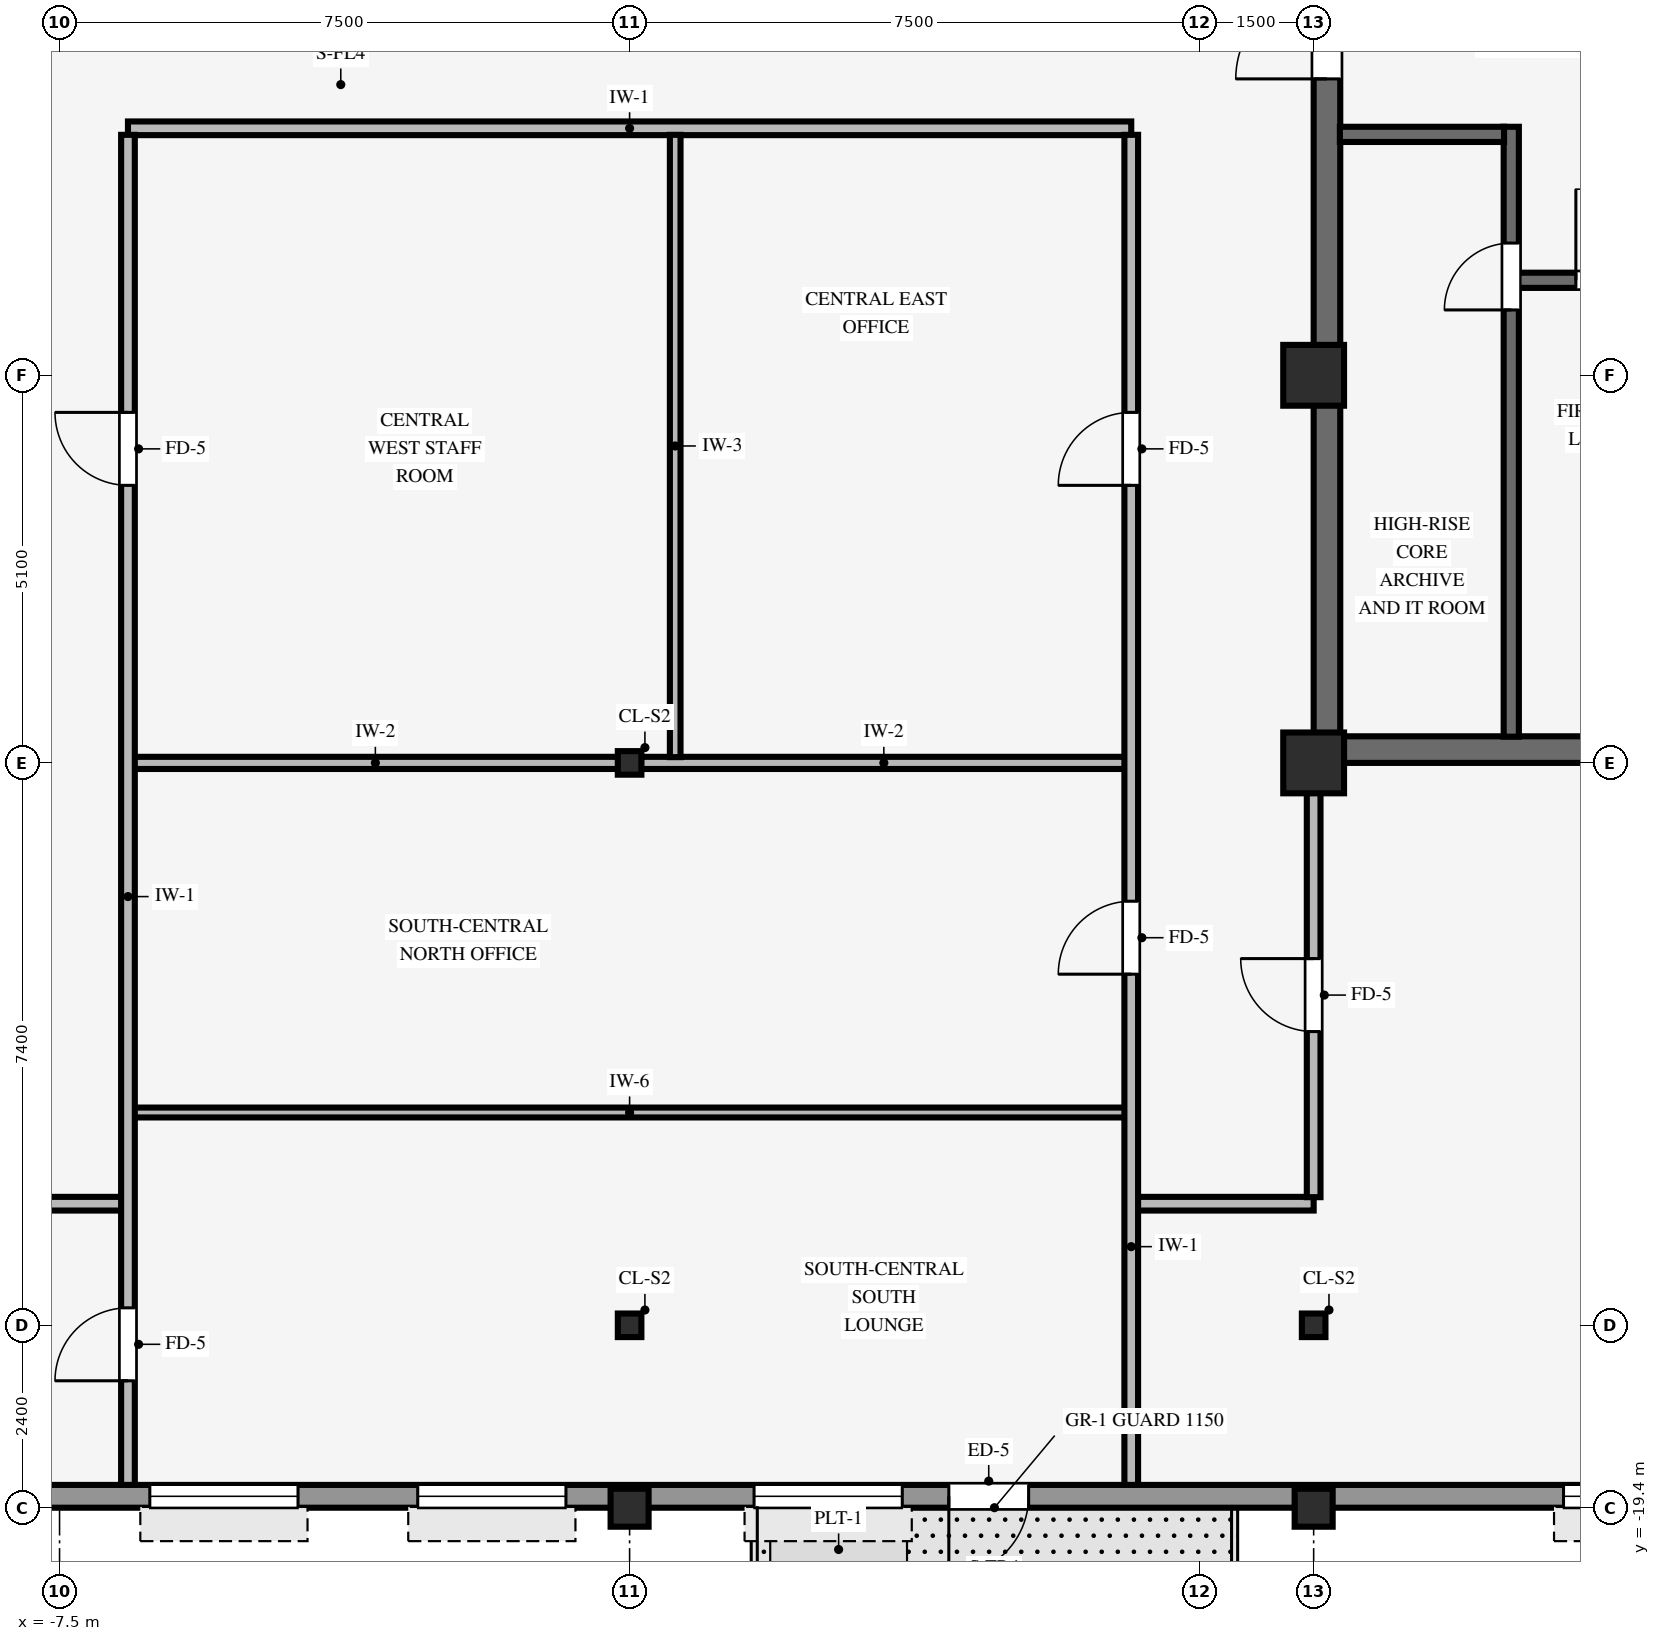
"""IFC4 building model, lengths in metres.
Left out: names, types, materials, properties, quantities, classifications, styles, units other than length and angle.
Written with IfcOpenShell. Run it as: python <this file> out.ifc"""

import sys

from ifc_helpers import new_model, si_unit, direction, frame, frame_2d, origin, origin_2d, place, context, subcontext, project, spatial, rectangle, hollow_rectangle, i_section, extrude, source, transform, mapped, element, fill, save


model = new_model("IFC4")
c1 = context("Model", 3, precision=1e-05, world=origin(), true_north=direction((0.0, 1.0)))
c2 = subcontext(c1, "Body", "Model", "MODEL_VIEW")
j1 = project(units=[si_unit("LENGTHUNIT", "METRE"), si_unit("PLANEANGLEUNIT", "RADIAN")], contexts=[c1])
p1 = place(None, origin())
s1 = spatial("IfcSite", under=j1, at=p1, CompositionType="ELEMENT")
p2 = place(p1, origin())
s2 = spatial("IfcBuilding", under=s1, at=p2, CompositionType="ELEMENT")
p3 = place(p2, frame((0.0, 0.0, 234.7)))
s3 = spatial("IfcBuildingStorey", under=s2, at=p3, CompositionType="ELEMENT", Elevation=234.7)
p4 = place(p3, frame((9.0, -9.425, 0.0), z_axis=(0.0, 0.0, 1.0), x_axis=(1.0, 0.0, 0.0)))
e1 = element("IfcWall", 1, at=p4, inside=s3, PredefinedType="SHEAR", context=c2, shape_type="SweptSolid", body=[
    extrude(rectangle(XDim=8.5, YDim=0.35, at=frame_2d((4.25, 0.0))), origin(), (0.0, 0.0, 1.0), 3.37),
])
p5 = place(p3, frame((9.175, -9.255, 0.0), z_axis=(0.0, 0.0, 1.0), x_axis=(0.0, 1.0, 0.0)))
e2 = element("IfcWall", 2, at=p5, inside=s3, PredefinedType="SHEAR", context=c2, shape_type="SweptSolid", body=[
    extrude(rectangle(XDim=18.51, YDim=0.35, at=frame_2d((9.255, 0.0))), origin(), (0.0, 0.0, 1.0), 3.37),
])
p6 = place(p5, frame((8.655, 0.0, 0.0)))
e3 = element("IfcOpeningElement", 3, at=p6, cuts=e2, PredefinedType="OPENING", context=c2, shape_type="SweptSolid", body=[
    extrude(rectangle(XDim=1.2, YDim=2.15, at=frame_2d((0.6, 1.075))), frame((0.0, 0.185, 0.0), z_axis=(0.0, -1.0, 0.0), x_axis=(1.0, 0.0, 0.0)), (0.0, 0.0, 1.0), 0.37),
])
for number, where, z_axis, x_axis in (
    (4, (9.0, -9.6, 0.0), (0.0, 0.0, 1.0), (1.0, 0.0, 0.0)),
    (5, (9.0, -4.5, 0.0), (0.0, 0.0, 1.0), (1.0, 0.0, 0.0)),
):
    element("IfcColumn", number, at=place(p3, frame(where, z_axis=z_axis, x_axis=x_axis)), inside=s3, PredefinedType="COLUMN", context=c2, shape_type="SweptSolid", body=[
        extrude(rectangle(XDim=0.8, YDim=0.8, at=origin_2d()), origin(), (0.0, 0.0, 1.0), 3.37),
    ])
for number, where, z_axis, x_axis in (
    (6, (0.0, -19.4, 0.0), (0.0, 0.0, 1.0), (1.0, 0.0, 0.0)),
    (7, (9.0, -19.4, 0.0), (0.0, 0.0, 1.0), (1.0, 0.0, 0.0)),
):
    element("IfcColumn", number, at=place(p3, frame(where, z_axis=z_axis, x_axis=x_axis)), inside=s3, PredefinedType="COLUMN", context=c2, shape_type="SweptSolid", body=[
        extrude(hollow_rectangle(XDim=0.5, YDim=0.5, WallThickness=0.032, InnerFilletRadius=0.032, OuterFilletRadius=0.064, at=origin_2d()), origin(), (0.0, 0.0, 1.0), 3.37),
    ])
for number, where, z_axis, x_axis in (
    (8, (0.0, -17.0, 0.0), (0.0, 0.0, 1.0), (1.0, 0.0, 0.0)),
    (9, (0.0, -9.6, 0.0), (0.0, 0.0, 1.0), (1.0, 0.0, 0.0)),
    (10, (9.0, -17.0, 0.0), (0.0, 0.0, 1.0), (1.0, 0.0, 0.0)),
):
    element("IfcColumn", number, at=place(p3, frame(where, z_axis=z_axis, x_axis=x_axis)), inside=s3, PredefinedType="COLUMN", context=c2, shape_type="SweptSolid", body=[
        extrude(i_section(OverallWidth=0.31, OverallDepth=0.31, WebThickness=0.015, FlangeThickness=0.015, FilletRadius=0.015, at=origin_2d()), origin(), (0.0, 0.0, 1.0), 3.37),
    ])
p7 = place(p3, frame((-24.3, -19.25, 0.0), z_axis=(0.0, 0.0, 1.0), x_axis=(1.0, 0.0, 0.0)))
e11 = element("IfcWall", 11, at=p7, inside=s3, PredefinedType="STANDARD", context=c2, shape_type="SweptSolid", body=[
    extrude(rectangle(XDim=41.0, YDim=0.3, at=frame_2d((20.5, 0.0))), origin(), (0.0, 0.0, 1.0), 2.705),
])
p8 = place(p7, frame((29.55, 0.0, 0.0), z_axis=(0.0, 0.0, 1.0), x_axis=(-1.0, 0.0, 0.0)))
e12 = element("IfcOpeningElement", 12, at=p8, cuts=e11, PredefinedType="OPENING", context=c2, shape_type="SweptSolid", body=[
    extrude(rectangle(XDim=1.05, YDim=2.1, at=frame_2d((0.525, 1.05))), frame((0.0, 0.16, 0.0), z_axis=(0.0, -1.0, 0.0), x_axis=(1.0, 0.0, 0.0)), (0.0, 0.0, 1.0), 0.32),
])
p9 = place(p7, frame((2.462, 0.0, 0.8)))
e13 = element("IfcOpeningElement", 13, at=p9, cuts=e11, PredefinedType="OPENING", context=c2, shape_type="SweptSolid", body=[
    extrude(rectangle(XDim=1.95, YDim=1.48, at=frame_2d((0.975, 0.74))), frame((0.0, 0.16, 0.0), z_axis=(0.0, -1.0, 0.0), x_axis=(1.0, 0.0, 0.0)), (0.0, 0.0, 1.0), 0.32),
])
p10 = place(p7, frame((7.788, 0.0, 0.8)))
e14 = element("IfcOpeningElement", 14, at=p10, cuts=e11, PredefinedType="OPENING", context=c2, shape_type="SweptSolid", body=[
    extrude(rectangle(XDim=1.95, YDim=1.48, at=frame_2d((0.975, 0.74))), frame((0.0, 0.16, 0.0), z_axis=(0.0, -1.0, 0.0), x_axis=(1.0, 0.0, 0.0)), (0.0, 0.0, 1.0), 0.32),
])
p11 = place(p7, frame((12.212, 0.0, 0.8)))
e15 = element("IfcOpeningElement", 15, at=p11, cuts=e11, PredefinedType="OPENING", context=c2, shape_type="SweptSolid", body=[
    extrude(rectangle(XDim=1.95, YDim=1.48, at=frame_2d((0.975, 0.74))), frame((0.0, 0.16, 0.0), z_axis=(0.0, -1.0, 0.0), x_axis=(1.0, 0.0, 0.0)), (0.0, 0.0, 1.0), 0.32),
])
p12 = place(p7, frame((17.988, 0.0, 0.8)))
e16 = element("IfcOpeningElement", 16, at=p12, cuts=e11, PredefinedType="OPENING", context=c2, shape_type="SweptSolid", body=[
    extrude(rectangle(XDim=1.95, YDim=1.48, at=frame_2d((0.975, 0.74))), frame((0.0, 0.16, 0.0), z_axis=(0.0, -1.0, 0.0), x_axis=(1.0, 0.0, 0.0)), (0.0, 0.0, 1.0), 0.32),
])
p13 = place(p7, frame((21.512, 0.0, 0.8)))
e17 = element("IfcOpeningElement", 17, at=p13, cuts=e11, PredefinedType="OPENING", context=c2, shape_type="SweptSolid", body=[
    extrude(rectangle(XDim=1.95, YDim=1.48, at=frame_2d((0.975, 0.74))), frame((0.0, 0.16, 0.0), z_axis=(0.0, -1.0, 0.0), x_axis=(1.0, 0.0, 0.0)), (0.0, 0.0, 1.0), 0.32),
])
p14 = place(p7, frame((25.938, 0.0, 0.8)))
e18 = element("IfcOpeningElement", 18, at=p14, cuts=e11, PredefinedType="OPENING", context=c2, shape_type="SweptSolid", body=[
    extrude(rectangle(XDim=1.95, YDim=1.48, at=frame_2d((0.975, 0.74))), frame((0.0, 0.16, 0.0), z_axis=(0.0, -1.0, 0.0), x_axis=(1.0, 0.0, 0.0)), (0.0, 0.0, 1.0), 0.32),
])
p15 = place(p7, frame((36.587, 0.0, 0.8)))
e19 = element("IfcOpeningElement", 19, at=p15, cuts=e11, PredefinedType="OPENING", context=c2, shape_type="SweptSolid", body=[
    extrude(rectangle(XDim=1.95, YDim=1.48, at=frame_2d((0.975, 0.74))), frame((0.0, 0.16, 0.0), z_axis=(0.0, -1.0, 0.0), x_axis=(1.0, 0.0, 0.0)), (0.0, 0.0, 1.0), 0.32),
])
p16 = place(p3, frame((11.6, -9.255, 0.0), z_axis=(0.0, 0.0, 1.0), x_axis=(0.0, 1.0, 0.0)))
e20 = element("IfcWall", 20, at=p16, inside=s3, PredefinedType="SHEAR", context=c2, shape_type="SweptSolid", body=[
    extrude(rectangle(XDim=8.025, YDim=0.2, at=frame_2d((4.012, 0.0))), origin(), (0.0, 0.0, 1.0), 3.37),
])
p17 = place(p16, frame((5.615, 0.0, 0.0)))
e21 = element("IfcOpeningElement", 21, at=p17, cuts=e20, PredefinedType="OPENING", context=c2, shape_type="SweptSolid", body=[
    extrude(rectangle(XDim=0.88, YDim=2.1, at=frame_2d((0.44, 1.05))), frame((0.0, 0.11, 0.0), z_axis=(0.0, -1.0, 0.0), x_axis=(1.0, 0.0, 0.0)), (0.0, 0.0, 1.0), 0.22),
])
p18 = place(p3, frame((11.695, -3.25, 0.0), z_axis=(0.0, 0.0, 1.0), x_axis=(1.0, 0.0, 0.0)))
e22 = element("IfcWall", 22, at=p18, inside=s3, PredefinedType="SHEAR", context=c2, shape_type="SweptSolid", body=[
    extrude(rectangle(XDim=2.76, YDim=0.2, at=frame_2d((1.38, 0.0))), origin(), (0.0, 0.0, 1.0), 3.37),
])
p19 = place(p18, frame((0.755, 0.0, 0.0)))
e23 = element("IfcOpeningElement", 23, at=p19, cuts=e22, PredefinedType="OPENING", context=c2, shape_type="SweptSolid", body=[
    extrude(rectangle(XDim=1.2, YDim=2.15, at=frame_2d((0.6, 1.075))), frame((0.0, 0.11, 0.0), z_axis=(0.0, -1.0, 0.0), x_axis=(1.0, 0.0, 0.0)), (0.0, 0.0, 1.0), 0.22),
])
p20 = place(p3, frame((9.345, -1.33, 0.0), z_axis=(0.0, 0.0, 1.0), x_axis=(1.0, 0.0, 0.0)))
e24 = element("IfcWall", 24, at=p20, inside=s3, PredefinedType="SHEAR", context=c2, shape_type="SweptSolid", body=[
    extrude(rectangle(XDim=2.16, YDim=0.2, at=frame_2d((1.08, 0.0))), origin(), (0.0, 0.0, 1.0), 3.37),
])
for number, where, z_axis, x_axis in (
    (25, (-9.0, -15.4, 0.0), (0.0, 0.0, 1.0), (1.0, 0.0, 0.0)),
    (26, (6.661, -15.4, 0.0), (0.0, 0.0, 1.0), (1.0, 0.0, 0.0)),
):
    element("IfcWall", number, at=place(p3, frame(where, z_axis=z_axis, x_axis=x_axis)), inside=s3, PredefinedType="PARTITIONING", context=c2, shape_type="SweptSolid", body=[
        extrude(rectangle(XDim=2.339, YDim=0.18, at=frame_2d((1.169, 0.0))), origin(), (0.0, 0.0, 1.0), 3.36),
    ])
p21 = place(p3, frame((-6.539, -14.2, 0.0), z_axis=(0.0, 0.0, 1.0), x_axis=(1.0, 0.0, 0.0)))
e27 = element("IfcWall", 27, at=p21, inside=s3, PredefinedType="PARTITIONING", context=c2, shape_type="SweptSolid", body=[
    extrude(rectangle(XDim=13.078, YDim=0.13, at=frame_2d((6.539, 0.0))), origin(), (0.0, 0.0, 1.0), 3.36),
])
for number, where, z_axis, x_axis in (
    (28, (-6.539, -9.6, 0.0), (0.0, 0.0, 1.0), (1.0, 0.0, 0.0)),
    (29, (0.151, -9.6, 0.0), (0.0, 0.0, 1.0), (1.0, 0.0, 0.0)),
):
    element("IfcWall", number, at=place(p3, frame(where, z_axis=z_axis, x_axis=x_axis)), inside=s3, PredefinedType="PARTITIONING", context=c2, shape_type="SweptSolid", body=[
        extrude(rectangle(XDim=6.388, YDim=0.16, at=frame_2d((3.194, 0.0))), origin(), (0.0, 0.0, 1.0), 2.405),
    ])
p22 = place(p3, frame((-6.6, -1.25, 0.0), z_axis=(0.0, 0.0, 1.0), x_axis=(1.0, 0.0, 0.0)))
e30 = element("IfcWall", 30, at=p22, inside=s3, PredefinedType="PARTITIONING", context=c2, shape_type="SweptSolid", body=[
    extrude(rectangle(XDim=13.2, YDim=0.18, at=frame_2d((6.6, 0.0))), origin(), (0.0, 0.0, 1.0), 3.36),
])
p23 = place(p3, frame((-6.6, -19.1, 0.0), z_axis=(0.0, 0.0, 1.0), x_axis=(0.0, 1.0, 0.0)))
e31 = element("IfcWall", 31, at=p23, inside=s3, PredefinedType="PARTITIONING", context=c2, shape_type="SweptSolid", body=[
    extrude(rectangle(XDim=17.764, YDim=0.18, at=frame_2d((8.882, 0.0))), origin(), (0.0, 0.0, 1.0), 3.36),
])
p24 = place(p23, frame((13.152, 0.0, 0.0)))
e32 = element("IfcOpeningElement", 32, at=p24, cuts=e31, PredefinedType="OPENING", context=c2, shape_type="SweptSolid", body=[
    extrude(rectangle(XDim=0.96, YDim=2.1, at=frame_2d((0.48, 1.05))), frame((0.0, 0.1, 0.0), z_axis=(0.0, -1.0, 0.0), x_axis=(1.0, 0.0, 0.0)), (0.0, 0.0, 1.0), 0.2),
])
p25 = place(p23, frame((1.37, 0.0, 0.0)))
e33 = element("IfcOpeningElement", 33, at=p25, cuts=e31, PredefinedType="OPENING", context=c2, shape_type="SweptSolid", body=[
    extrude(rectangle(XDim=0.96, YDim=2.1, at=frame_2d((0.48, 1.05))), frame((0.0, 0.1, 0.0), z_axis=(0.0, -1.0, 0.0), x_axis=(1.0, 0.0, 0.0)), (0.0, 0.0, 1.0), 0.2),
])
p26 = place(p3, frame((0.6, -9.524, 0.0), z_axis=(0.0, 0.0, 1.0), x_axis=(0.0, 1.0, 0.0)))
e34 = element("IfcWall", 34, at=p26, inside=s3, PredefinedType="PARTITIONING", context=c2, shape_type="SweptSolid", body=[
    extrude(rectangle(XDim=8.188, YDim=0.14, at=frame_2d((4.094, 0.0))), origin(), (0.0, 0.0, 1.0), 3.36),
])
p27 = place(p3, frame((6.6, -19.1, 0.0), z_axis=(0.0, 0.0, 1.0), x_axis=(0.0, 1.0, 0.0)))
e35 = element("IfcWall", 35, at=p27, inside=s3, PredefinedType="PARTITIONING", context=c2, shape_type="SweptSolid", body=[
    extrude(rectangle(XDim=17.764, YDim=0.18, at=frame_2d((8.882, 0.0))), origin(), (0.0, 0.0, 1.0), 3.36),
])
p28 = place(p27, frame((13.152, 0.0, 0.0)))
e36 = element("IfcOpeningElement", 36, at=p28, cuts=e35, PredefinedType="OPENING", context=c2, shape_type="SweptSolid", body=[
    extrude(rectangle(XDim=0.96, YDim=2.1, at=frame_2d((0.48, 1.05))), frame((0.0, 0.1, 0.0), z_axis=(0.0, -1.0, 0.0), x_axis=(1.0, 0.0, 0.0)), (0.0, 0.0, 1.0), 0.2),
])
p29 = place(p27, frame((6.72, 0.0, 0.0)))
e37 = element("IfcOpeningElement", 37, at=p29, cuts=e35, PredefinedType="OPENING", context=c2, shape_type="SweptSolid", body=[
    extrude(rectangle(XDim=0.96, YDim=2.1, at=frame_2d((0.48, 1.05))), frame((0.0, 0.1, 0.0), z_axis=(0.0, -1.0, 0.0), x_axis=(1.0, 0.0, 0.0)), (0.0, 0.0, 1.0), 0.2),
])
p30 = place(p3, frame((9.0, -15.314, 0.0), z_axis=(0.0, 0.0, 1.0), x_axis=(0.0, 1.0, 0.0)))
e38 = element("IfcWall", 38, at=p30, inside=s3, PredefinedType="PARTITIONING", context=c2, shape_type="SweptSolid", body=[
    extrude(rectangle(XDim=5.318, YDim=0.18, at=frame_2d((2.659, 0.0))), origin(), (0.0, 0.0, 1.0), 2.892),
])
p31 = place(p30, frame((2.179, 0.0, 0.0)))
e39 = element("IfcOpeningElement", 39, at=p31, cuts=e38, PredefinedType="OPENING", context=c2, shape_type="SweptSolid", body=[
    extrude(rectangle(XDim=0.96, YDim=2.1, at=frame_2d((0.48, 1.05))), frame((0.0, 0.1, 0.0), z_axis=(0.0, -1.0, 0.0), x_axis=(1.0, 0.0, 0.0)), (0.0, 0.0, 1.0), 0.2),
])
m1 = source(origin(), c2, "Body", "SweptSolid", [
    extrude(rectangle(XDim=1.05, YDim=2.1, at=frame_2d((0.525, 1.05))), frame((0.0, 0.025, 0.0), z_axis=(0.0, -1.0, 0.0), x_axis=(1.0, 0.0, 0.0)), (0.0, 0.0, 1.0), 0.05),
])
p32 = place(p8, origin())
e40 = element("IfcDoor", 40, at=p32, inside=s3, OperationType="SINGLE_SWING_RIGHT", PredefinedType="DOOR", context=c2, shape_type="MappedRepresentation", body=[
    mapped(m1, transform((0.0, 0.0, 0.0), scale=1.0)),
])
fill(e12, e40)
m2 = source(origin(), c2, "Body", "SweptSolid", [
    extrude(rectangle(XDim=1.95, YDim=1.48, at=frame_2d((0.975, 0.74))), frame((0.0, 0.03, 0.0), z_axis=(0.0, -1.0, 0.0), x_axis=(1.0, 0.0, 0.0)), (0.0, 0.0, 1.0), 0.06),
])
p33 = place(p12, origin())
e41 = element("IfcWindow", 41, at=p33, inside=s3, PartitioningType="SINGLE_PANEL", PredefinedType="WINDOW", context=c2, shape_type="MappedRepresentation", body=[
    mapped(m2, transform((0.0, 0.0, 0.0), scale=1.0)),
])
fill(e16, e41)
p34 = place(p13, origin())
e42 = element("IfcWindow", 42, at=p34, inside=s3, PartitioningType="SINGLE_PANEL", PredefinedType="WINDOW", context=c2, shape_type="MappedRepresentation", body=[
    mapped(m2, transform((0.0, 0.0, 0.0), scale=1.0)),
])
fill(e17, e42)
p35 = place(p14, origin())
e43 = element("IfcWindow", 43, at=p35, inside=s3, PartitioningType="SINGLE_PANEL", PredefinedType="WINDOW", context=c2, shape_type="MappedRepresentation", body=[
    mapped(m2, transform((0.0, 0.0, 0.0), scale=1.0)),
])
fill(e18, e43)
p36 = place(p15, origin())
e44 = element("IfcWindow", 44, at=p36, inside=s3, PartitioningType="SINGLE_PANEL", PredefinedType="WINDOW", context=c2, shape_type="MappedRepresentation", body=[
    mapped(m2, transform((0.0, 0.0, 0.0), scale=1.0)),
])
fill(e19, e44)
m3 = source(origin(), c2, "Body", "SweptSolid", [
    extrude(rectangle(XDim=1.2, YDim=2.15, at=frame_2d((0.6, 1.075))), frame((0.0, 0.025, 0.0), z_axis=(0.0, -1.0, 0.0), x_axis=(1.0, 0.0, 0.0)), (0.0, 0.0, 1.0), 0.05),
])
p37 = place(p19, origin())
e45 = element("IfcDoor", 45, at=p37, inside=s3, OperationType="SINGLE_SWING_LEFT", PredefinedType="DOOR", context=c2, shape_type="MappedRepresentation", body=[
    mapped(m3, transform((0.0, 0.0, 0.0), scale=1.0)),
])
fill(e23, e45)
m4 = source(origin(), c2, "Body", "SweptSolid", [
    extrude(rectangle(XDim=0.88, YDim=2.1, at=frame_2d((0.44, 1.05))), frame((0.0, 0.025, 0.0), z_axis=(0.0, -1.0, 0.0), x_axis=(1.0, 0.0, 0.0)), (0.0, 0.0, 1.0), 0.05),
])
p38 = place(p17, origin())
e46 = element("IfcDoor", 46, at=p38, inside=s3, OperationType="SINGLE_SWING_LEFT", PredefinedType="DOOR", context=c2, shape_type="MappedRepresentation", body=[
    mapped(m4, transform((0.0, 0.0, 0.0), scale=1.0)),
])
fill(e21, e46)
p39 = place(p6, origin())
e47 = element("IfcDoor", 47, at=p39, inside=s3, OperationType="SINGLE_SWING_LEFT", PredefinedType="DOOR", context=c2, shape_type="MappedRepresentation", body=[
    mapped(m3, transform((0.0, 0.0, 0.0), scale=1.0)),
])
fill(e3, e47)
m5 = source(origin(), c2, "Body", "SweptSolid", [
    extrude(rectangle(XDim=0.96, YDim=2.1, at=frame_2d((0.48, 1.05))), frame((0.0, 0.025, 0.0), z_axis=(0.0, -1.0, 0.0), x_axis=(1.0, 0.0, 0.0)), (0.0, 0.0, 1.0), 0.05),
])
p40 = place(p24, origin())
e48 = element("IfcDoor", 48, at=p40, inside=s3, OperationType="SINGLE_SWING_RIGHT", PredefinedType="DOOR", context=c2, shape_type="MappedRepresentation", body=[
    mapped(m5, transform((0.0, 0.0, 0.0), scale=1.0)),
])
fill(e32, e48)
p41 = place(p28, origin())
e49 = element("IfcDoor", 49, at=p41, inside=s3, OperationType="SINGLE_SWING_LEFT", PredefinedType="DOOR", context=c2, shape_type="MappedRepresentation", body=[
    mapped(m5, transform((0.0, 0.0, 0.0), scale=1.0)),
])
fill(e36, e49)
p42 = place(p31, origin())
e50 = element("IfcDoor", 50, at=p42, inside=s3, OperationType="SINGLE_SWING_RIGHT", PredefinedType="DOOR", context=c2, shape_type="MappedRepresentation", body=[
    mapped(m5, transform((0.0, 0.0, 0.0), scale=1.0)),
])
fill(e39, e50)
p43 = place(p29, origin())
e51 = element("IfcDoor", 51, at=p43, inside=s3, OperationType="SINGLE_SWING_LEFT", PredefinedType="DOOR", context=c2, shape_type="MappedRepresentation", body=[
    mapped(m5, transform((0.0, 0.0, 0.0), scale=1.0)),
])
fill(e37, e51)
p44 = place(p25, origin())
e52 = element("IfcDoor", 52, at=p44, inside=s3, OperationType="SINGLE_SWING_LEFT", PredefinedType="DOOR", context=c2, shape_type="MappedRepresentation", body=[
    mapped(m5, transform((0.0, 0.0, 0.0), scale=1.0)),
])
fill(e33, e52)
save(model, sys.argv[1])
